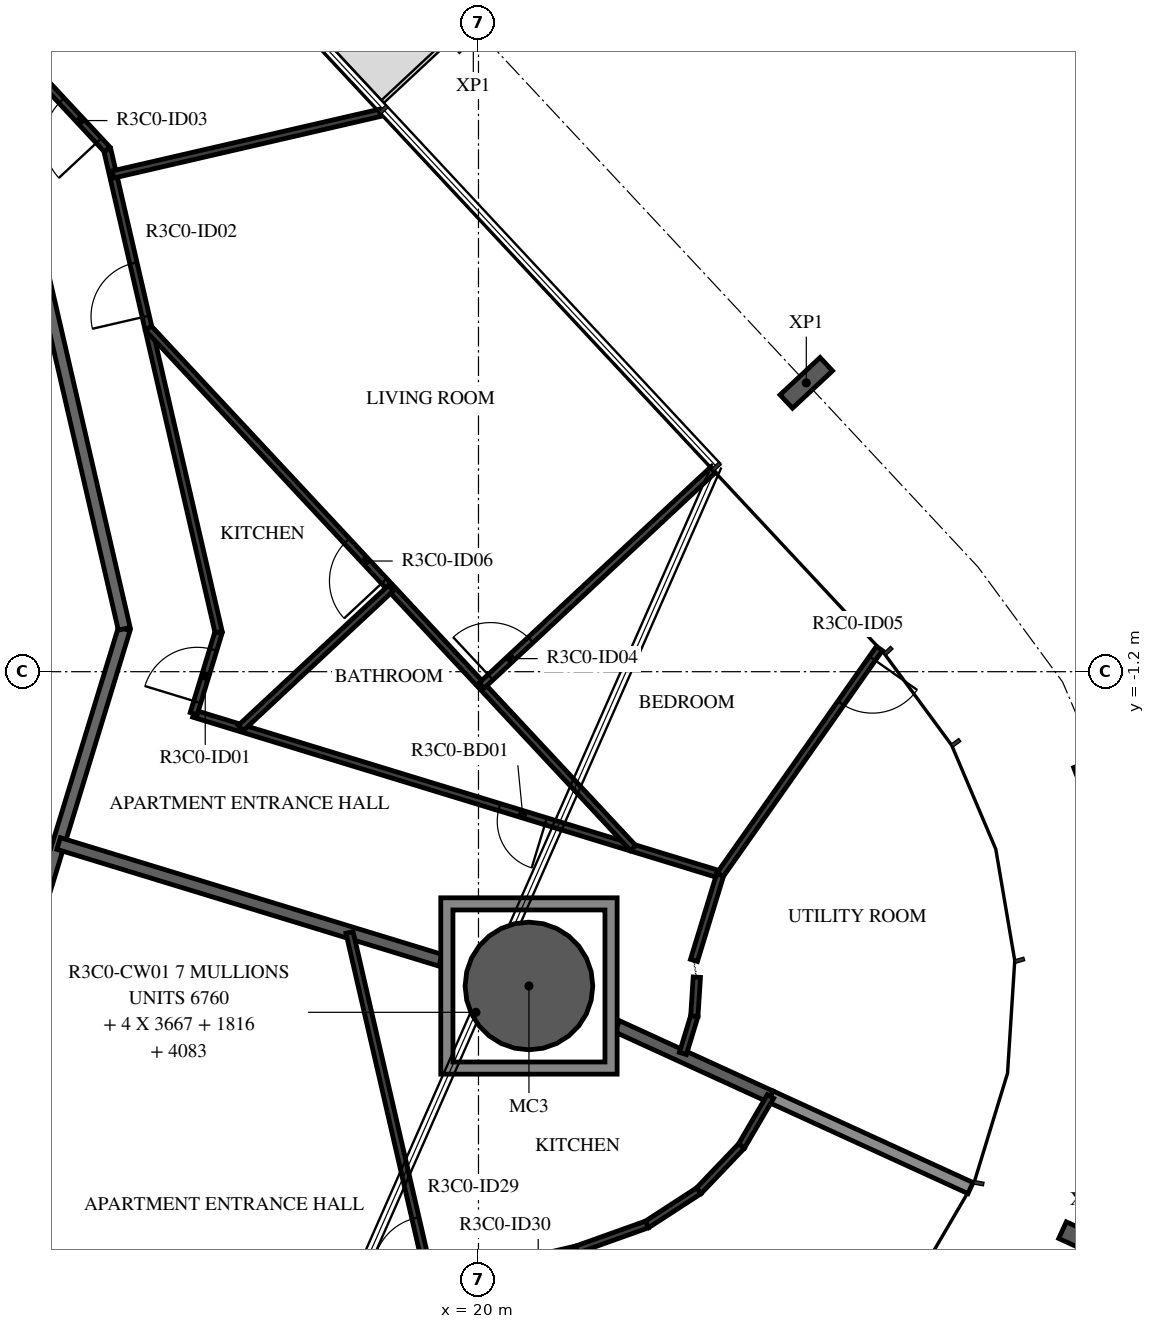
"""IFC4 building model, lengths in metres.
Left out: names, types, materials, properties, quantities, classifications, styles, units other than length and angle.
Written with IfcOpenShell. Run it as: python <this file> out.ifc"""

import sys

from ifc_helpers import new_model, si_unit, direction, frame, frame_2d, origin, origin_2d, place, context, subcontext, project, spatial, polyline, rectangle, hollow_circle, i_section, outline, extrude, element, fill, save


model = new_model("IFC4")
c1 = context("Model", 3, precision=1e-05, world=origin(), true_north=direction((0.0, 1.0)))
c2 = subcontext(c1, "Body", "Model", "MODEL_VIEW")
j1 = project(units=[si_unit("LENGTHUNIT", "METRE"), si_unit("PLANEANGLEUNIT", "RADIAN")], contexts=[c1])
p1 = place(None, origin())
s1 = spatial("IfcSite", under=j1, at=p1, CompositionType="ELEMENT")
p2 = place(p1, origin())
s2 = spatial("IfcBuilding", under=s1, at=p2, CompositionType="ELEMENT")
p3 = place(p2, frame((0.0, 0.0, 134.4)))
s3 = spatial("IfcBuildingStorey", under=s2, at=p3, CompositionType="ELEMENT", Elevation=134.4)
p4 = place(p3, frame((20.83, -6.368, -0.38), z_axis=(0.0, 0.0, 1.0), x_axis=(1.0, 0.0, 0.0)))
e1 = element("IfcColumn", 1, at=p4, inside=s3, PredefinedType="COLUMN", context=c2, shape_type="SweptSolid", body=[
    extrude(hollow_circle(Radius=1.05, WallThickness=0.05, at=origin_2d()), origin(), (0.0, 0.0, 1.0), 3.5),
])
for number, where, z_axis, x_axis in (
    (2, (30.014, -10.571, -0.38), (0.0, 0.0, 1.0), (-0.416, -0.909, 0.0)),
    (3, (30.262, -2.756, -0.38), (0.0, 0.0, 1.0), (0.358, -0.934, 0.0)),
    (4, (25.391, 3.55, -0.38), (0.0, 0.0, 1.0), (0.682, -0.731, 0.0)),
):
    element("IfcColumn", number, at=place(p3, frame(where, z_axis=z_axis, x_axis=x_axis)), inside=s3, PredefinedType="COLUMN", context=c2, shape_type="SweptSolid", body=[
        extrude(i_section(OverallWidth=0.3, OverallDepth=0.9, WebThickness=0.019, FlangeThickness=0.035, FilletRadius=0.03, at=origin_2d()), origin(), (0.0, 0.0, 1.0), 3.5),
    ])
p5 = place(p3, frame((12.028, -7.516, 0.0), z_axis=(0.0, 0.0, 1.0), x_axis=(0.292365533182, 0.956306642771, 0.0)))
e5 = element("IfcWall", 5, at=p5, inside=s3, PredefinedType="STANDARD", context=c2, shape_type="SweptSolid", body=[
    extrude(rectangle(XDim=7.342, YDim=0.2, at=frame_2d((3.671, 0.0))), origin(), (0.0, 0.0, 1.0), 3.12),
])
p6 = place(p3, frame((14.175, -0.495, 0.0), z_axis=(0.0, 0.0, 1.0), x_axis=(-0.224922649383, 0.974376622151, 0.0)))
e6 = element("IfcWall", 6, at=p6, inside=s3, PredefinedType="STANDARD", context=c2, shape_type="SweptSolid", body=[
    extrude(rectangle(XDim=7.342, YDim=0.2, at=frame_2d((3.671, 0.0))), origin(), (0.0, 0.0, 1.0), 3.12),
])
p7 = place(p3, frame((13.095, -4.026, 0.0), z_axis=(0.0, 0.0, 1.0), x_axis=(0.956303942966, -0.292374363904, 0.0)))
e7 = element("IfcWall", 7, at=p7, inside=s3, PredefinedType="STANDARD", context=c2, shape_type="SweptSolid", body=[
    extrude(rectangle(XDim=6.567, YDim=0.2, at=frame_2d((3.284, 0.0))), origin(), (0.0, 0.0, 1.0), 3.12),
])
p8 = place(p3, frame((22.28, -7.032, 0.0), z_axis=(0.0, 0.0, 1.0), x_axis=(0.909302252994, -0.416136291016, 0.0)))
e8 = element("IfcWall", 8, at=p8, inside=s3, PredefinedType="STANDARD", context=c2, shape_type="SweptSolid", body=[
    extrude(rectangle(XDim=2.773, YDim=0.2, at=frame_2d((1.387, 0.0))), origin(), (0.0, 0.0, 1.0), 3.12),
])
p9 = place(p3, frame((24.802, -8.186, 0.0), z_axis=(0.0, 0.0, 1.0), x_axis=(0.909307466213, -0.416124899387, 0.0)))
e9 = element("IfcWall", 9, at=p9, inside=s3, PredefinedType="STANDARD", context=c2, shape_type="SweptSolid", body=[
    extrude(rectangle(XDim=3.618, YDim=0.2, at=frame_2d((1.809, 0.0))), origin(), (0.0, 0.0, 1.0), 2.73),
])
p10 = place(p3, frame((23.975, -4.537, 0.0), z_axis=(0.0, 0.0, 1.0), x_axis=(-0.956300480156, 0.292385689892, 0.0)))
e10 = element("IfcWall", 10, at=p10, inside=s3, PredefinedType="PARTITIONING", context=c2, shape_type="SweptSolid", body=[
    extrude(rectangle(XDim=9.054, YDim=0.12, at=frame_2d((4.527, 0.0))), origin(), (0.0, 0.0, 1.0), 3.12),
])
p11 = place(p10, frame((2.998, 0.0, 0.0)))
e11 = element("IfcOpeningElement", 11, at=p11, cuts=e10, PredefinedType="OPENING", context=c2, shape_type="SweptSolid", body=[
    extrude(rectangle(XDim=0.8, YDim=2.1, at=frame_2d((0.4, 1.05))), frame((0.0, 0.07, 0.0), z_axis=(0.0, -1.0, 0.0), x_axis=(1.0, 0.0, 0.0)), (0.0, 0.0, 1.0), 0.14),
])
p12 = place(p3, frame((15.317, -1.89, 0.0), z_axis=(0.0, 0.0, 1.0), x_axis=(0.292360095486, 0.956308305186, 0.0)))
e12 = element("IfcWall", 12, at=p12, inside=s3, PredefinedType="PARTITIONING", context=c2, shape_type="SweptSolid", body=[
    extrude(rectangle(XDim=1.402, YDim=0.12, at=frame_2d((0.701, 0.0))), origin(), (0.0, 0.0, 1.0), 3.12),
])
p13 = place(p12, frame((0.2, 0.0, 0.0)))
e13 = element("IfcOpeningElement", 13, at=p13, cuts=e12, PredefinedType="OPENING", context=c2, shape_type="SweptSolid", body=[
    extrude(rectangle(XDim=0.9, YDim=2.1, at=frame_2d((0.45, 1.05))), frame((0.0, 0.07, 0.0), z_axis=(0.0, -1.0, 0.0), x_axis=(1.0, 0.0, 0.0)), (0.0, 0.0, 1.0), 0.14),
])
p14 = place(p3, frame((15.727, -0.549, 0.0), z_axis=(0.0, 0.0, 1.0), x_axis=(-0.22493611855, 0.974373512864, 0.0)))
e14 = element("IfcWall", 14, at=p14, inside=s3, PredefinedType="PARTITIONING", context=c2, shape_type="SweptSolid", body=[
    extrude(rectangle(XDim=8.146, YDim=0.12, at=frame_2d((4.073, 0.0))), origin(), (0.0, 0.0, 1.0), 3.12),
])
p15 = place(p14, frame((5.327, 0.0, 0.0)))
e15 = element("IfcOpeningElement", 15, at=p15, cuts=e14, PredefinedType="OPENING", context=c2, shape_type="SweptSolid", body=[
    extrude(rectangle(XDim=0.9, YDim=2.1, at=frame_2d((0.45, 1.05))), frame((0.0, 0.07, 0.0), z_axis=(0.0, -1.0, 0.0), x_axis=(1.0, 0.0, 0.0)), (0.0, 0.0, 1.0), 0.14),
])
p16 = place(p3, frame((13.894, 7.388, 0.0), z_axis=(0.0, 0.0, 1.0), x_axis=(-0.681994622729, 0.731357186721, 0.0)))
e16 = element("IfcWall", 16, at=p16, inside=s3, PredefinedType="PARTITIONING", context=c2, shape_type="SweptSolid", body=[
    extrude(rectangle(XDim=8.146, YDim=0.12, at=frame_2d((4.073, 0.0))), origin(), (0.0, 0.0, 1.0), 3.12),
])
p17 = place(p16, frame((0.2, 0.0, 0.0)))
e17 = element("IfcOpeningElement", 17, at=p17, cuts=e16, PredefinedType="OPENING", context=c2, shape_type="SweptSolid", body=[
    extrude(rectangle(XDim=0.9, YDim=2.1, at=frame_2d((0.45, 1.05))), frame((0.0, 0.07, 0.0), z_axis=(0.0, -1.0, 0.0), x_axis=(1.0, 0.0, 0.0)), (0.0, 0.0, 1.0), 0.14),
])
for number, where, z_axis, x_axis in (
    (18, (23.362, -7.478, 0.0), (0.0, 0.0, 1.0), (0.293, 0.956, 0.0)),
    (19, (23.55, -6.864, 0.0), (0.0, 0.0, 1.0), (0.064, 0.998, 0.0)),
):
    element("IfcWall", number, at=place(p3, frame(where, z_axis=z_axis, x_axis=x_axis)), inside=s3, PredefinedType="PARTITIONING", context=c2, shape_type="SweptSolid", body=[
        extrude(rectangle(XDim=0.642, YDim=0.12, at=frame_2d((0.321, 0.0))), origin(), (0.0, 0.0, 1.0), 3.12),
    ])
p18 = place(p3, frame((23.544, -5.948, 0.0), z_axis=(0.0, 0.0, 1.0), x_axis=(0.292386782861, 0.956300145983, 0.0)))
e20 = element("IfcWall", 20, at=p18, inside=s3, PredefinedType="PARTITIONING", context=c2, shape_type="SweptSolid", body=[
    extrude(rectangle(XDim=1.475, YDim=0.12, at=frame_2d((0.737, 0.0))), origin(), (0.0, 0.0, 1.0), 3.12),
])
p19 = place(p3, frame((22.543, -4.1, 0.0), z_axis=(0.0, 0.0, 1.0), x_axis=(-0.681980976228, 0.731369911921, 0.0)))
e21 = element("IfcWall", 21, at=p19, inside=s3, PredefinedType="PARTITIONING", context=c2, shape_type="SweptSolid", body=[
    extrude(rectangle(XDim=11.686, YDim=0.12, at=frame_2d((5.843, 0.0))), origin(), (0.0, 0.0, 1.0), 3.12),
])
p20 = place(p19, frame((6.003, 0.0, 0.0)))
e22 = element("IfcOpeningElement", 22, at=p20, cuts=e21, PredefinedType="OPENING", context=c2, shape_type="SweptSolid", body=[
    extrude(rectangle(XDim=0.9, YDim=2.1, at=frame_2d((0.45, 1.05))), frame((0.0, 0.07, 0.0), z_axis=(0.0, -1.0, 0.0), x_axis=(1.0, 0.0, 0.0)), (0.0, 0.0, 1.0), 0.14),
])
p21 = place(p3, frame((16.091, -2.127, 0.0), z_axis=(0.0, 0.0, 1.0), x_axis=(0.731389706697, 0.6819597473, 0.0)))
e23 = element("IfcWall", 23, at=p21, inside=s3, PredefinedType="PARTITIONING", context=c2, shape_type="SweptSolid", body=[
    extrude(rectangle(XDim=3.374, YDim=0.12, at=frame_2d((1.687, 0.0))), origin(), (0.0, 0.0, 1.0), 3.12),
])
p22 = place(p3, frame((18.379, 7.99, 0.0), z_axis=(0.0, 0.0, 1.0), x_axis=(-0.974372926515, -0.224938658471, 0.0)))
e24 = element("IfcWall", 24, at=p22, inside=s3, PredefinedType="PARTITIONING", context=c2, shape_type="SweptSolid", body=[
    extrude(rectangle(XDim=4.505, YDim=0.12, at=frame_2d((2.253, 0.0))), origin(), (0.0, 0.0, 1.0), 3.12),
])
p23 = place(p3, frame((20.052, -1.428, 0.0), z_axis=(0.0, 0.0, 1.0), x_axis=(0.73134872518, 0.682003696601, 0.0)))
e25 = element("IfcWall", 25, at=p23, inside=s3, PredefinedType="PARTITIONING", context=c2, shape_type="SweptSolid", body=[
    extrude(rectangle(XDim=5.2, YDim=0.12, at=frame_2d((2.6, 0.0))), origin(), (0.0, 0.0, 1.0), 2.73),
])
p24 = place(p23, frame((0.2, 0.0, 0.0)))
e26 = element("IfcOpeningElement", 26, at=p24, cuts=e25, PredefinedType="OPENING", context=c2, shape_type="SweptSolid", body=[
    extrude(rectangle(XDim=0.9, YDim=2.1, at=frame_2d((0.45, 1.05))), frame((0.0, 0.07, 0.0), z_axis=(0.0, -1.0, 0.0), x_axis=(1.0, 0.0, 0.0)), (0.0, 0.0, 1.0), 0.14),
])
p25 = place(p3, frame((26.593, -0.818, 0.0), z_axis=(0.0, 0.0, 1.0), x_axis=(-0.575629018128, -0.817710971853, 0.0)))
e27 = element("IfcWall", 27, at=p25, inside=s3, PredefinedType="PARTITIONING", context=c2, shape_type="SweptSolid", body=[
    extrude(rectangle(XDim=4.548, YDim=0.12, at=frame_2d((2.274, 0.0))), origin(), (0.0, 0.0, 1.0), 3.12),
])
p26 = place(p25, frame((0.2, 0.0, 0.0)))
e28 = element("IfcOpeningElement", 28, at=p26, cuts=e27, PredefinedType="OPENING", context=c2, shape_type="SweptSolid", body=[
    extrude(rectangle(XDim=0.9, YDim=2.1, at=frame_2d((0.45, 1.05))), frame((0.0, 0.07, 0.0), z_axis=(0.0, -1.0, 0.0), x_axis=(1.0, 0.0, 0.0)), (0.0, 0.0, 1.0), 0.14),
])
p27 = place(p3, frame((12.434, -9.189, 0.0), z_axis=(0.0, 0.0, 1.0), x_axis=(0.224924972887, -0.974376085796, 0.0)))
e29 = element("IfcWall", 29, at=p27, inside=s3, PredefinedType="PARTITIONING", context=c2, shape_type="SweptSolid", body=[
    extrude(rectangle(XDim=3.541, YDim=0.12, at=frame_2d((1.771, 0.0))), origin(), (0.0, 0.0, 1.0), 3.12),
])
p28 = place(p3, frame((19.211, -11.258, 0.0), z_axis=(0.0, 0.0, 1.0), x_axis=(-0.22499500936, 0.974359915926, 0.0)))
e30 = element("IfcWall", 30, at=p28, inside=s3, PredefinedType="PARTITIONING", context=c2, shape_type="SweptSolid", body=[
    extrude(rectangle(XDim=5.921, YDim=0.12, at=frame_2d((2.961, 0.0))), origin(), (0.0, 0.0, 1.0), 3.12),
])
p29 = place(p28, frame((0.2, 0.0, 0.0)))
e31 = element("IfcOpeningElement", 31, at=p29, cuts=e30, PredefinedType="OPENING", context=c2, shape_type="SweptSolid", body=[
    extrude(rectangle(XDim=0.9, YDim=2.1, at=frame_2d((0.45, 1.05))), frame((0.0, 0.07, 0.0), z_axis=(0.0, -1.0, 0.0), x_axis=(1.0, 0.0, 0.0)), (0.0, 0.0, 1.0), 0.14),
])
p30 = place(p3, frame((24.802, -8.186, 0.0), z_axis=(0.0, 0.0, 1.0), x_axis=(-0.505043103481, -0.863094122113, 0.0)))
e32 = element("IfcWall", 32, at=p30, inside=s3, PredefinedType="PARTITIONING", context=c2, shape_type="SweptSolid", body=[
    extrude(rectangle(XDim=0.945, YDim=0.12, at=frame_2d((0.473, 0.0))), origin(), (0.0, 0.0, 1.0), 3.12),
])
for number, where, z_axis, x_axis in (
    (33, (24.324, -9.002, 0.0), (0.0, 0.0, 1.0), (-0.69, -0.723, 0.0)),
    (34, (23.623, -9.737, 0.0), (0.0, 0.0, 1.0), (-0.839, -0.545, 0.0)),
):
    element("IfcWall", number, at=place(p3, frame(where, z_axis=z_axis, x_axis=x_axis)), inside=s3, PredefinedType="PARTITIONING", context=c2, shape_type="SweptSolid", body=[
        extrude(rectangle(XDim=1.016, YDim=0.12, at=frame_2d((0.508, 0.0))), origin(), (0.0, 0.0, 1.0), 3.12),
    ])
p31 = place(p3, frame((22.771, -10.29, 0.0), z_axis=(0.0, 0.0, 1.0), x_axis=(-0.941701391526, -0.336449831623, 0.0)))
e35 = element("IfcWall", 35, at=p31, inside=s3, PredefinedType="PARTITIONING", context=c2, shape_type="SweptSolid", body=[
    extrude(rectangle(XDim=1.227, YDim=0.12, at=frame_2d((0.614, 0.0))), origin(), (0.0, 0.0, 1.0), 3.12),
])
p32 = place(p3, frame((21.615, -10.703, 0.0), z_axis=(0.0, 0.0, 1.0), x_axis=(-0.974361171506, -0.224989571893, 0.0)))
e36 = element("IfcWall", 36, at=p32, inside=s3, PredefinedType="PARTITIONING", context=c2, shape_type="SweptSolid", body=[
    extrude(rectangle(XDim=2.468, YDim=0.12, at=frame_2d((1.234, 0.0))), origin(), (0.0, 0.0, 1.0), 3.12),
])
p33 = place(p32, frame((0.2, 0.0, 0.0)))
e37 = element("IfcOpeningElement", 37, at=p33, cuts=e36, PredefinedType="OPENING", context=c2, shape_type="SweptSolid", body=[
    extrude(rectangle(XDim=0.9, YDim=2.1, at=frame_2d((0.45, 1.05))), frame((0.0, 0.07, 0.0), z_axis=(0.0, -1.0, 0.0), x_axis=(1.0, 0.0, 0.0)), (0.0, 0.0, 1.0), 0.14),
])
p34 = place(p3, origin())
e38 = element("IfcWall", 38, at=p34, inside=s3, PredefinedType="STANDARD", context=c2, shape_type="SweptSolid", body=[
    extrude(outline(polyline([(22.28, -4.918), (22.28, -7.818), (19.38, -7.818), (19.38, -4.918), (22.28, -4.918)]), holes=[polyline([(19.58, -7.618), (22.08, -7.618), (22.08, -5.118), (19.58, -5.118), (19.58, -7.618)])]), origin(), (0.0, 0.0, 1.0), 3.12),
])
p35 = place(p13, origin())
e39 = element("IfcDoor", 39, at=p35, inside=s3, OperationType="SINGLE_SWING_LEFT", PredefinedType="DOOR", context=c2, shape_type="SweptSolid", body=[
    extrude(rectangle(XDim=0.9, YDim=2.1, at=frame_2d((0.45, 1.05))), frame((0.0, 0.025, 0.0), z_axis=(0.0, -1.0, 0.0), x_axis=(1.0, 0.0, 0.0)), (0.0, 0.0, 1.0), 0.05),
])
fill(e13, e39)
p36 = place(p15, origin())
e40 = element("IfcDoor", 40, at=p36, inside=s3, OperationType="SINGLE_SWING_LEFT", PredefinedType="DOOR", context=c2, shape_type="SweptSolid", body=[
    extrude(rectangle(XDim=0.9, YDim=2.1, at=frame_2d((0.45, 1.05))), frame((0.0, 0.025, 0.0), z_axis=(0.0, -1.0, 0.0), x_axis=(1.0, 0.0, 0.0)), (0.0, 0.0, 1.0), 0.05),
])
fill(e15, e40)
p37 = place(p17, origin())
e41 = element("IfcDoor", 41, at=p37, inside=s3, OperationType="SINGLE_SWING_LEFT", PredefinedType="DOOR", context=c2, shape_type="SweptSolid", body=[
    extrude(rectangle(XDim=0.9, YDim=2.1, at=frame_2d((0.45, 1.05))), frame((0.0, 0.025, 0.0), z_axis=(0.0, -1.0, 0.0), x_axis=(1.0, 0.0, 0.0)), (0.0, 0.0, 1.0), 0.05),
])
fill(e17, e41)
p38 = place(p11, origin())
e42 = element("IfcDoor", 42, at=p38, inside=s3, OperationType="SINGLE_SWING_LEFT", PredefinedType="DOOR", context=c2, shape_type="SweptSolid", body=[
    extrude(rectangle(XDim=0.8, YDim=2.1, at=frame_2d((0.4, 1.05))), frame((0.0, 0.025, 0.0), z_axis=(0.0, -1.0, 0.0), x_axis=(1.0, 0.0, 0.0)), (0.0, 0.0, 1.0), 0.05),
])
fill(e11, e42)
p39 = place(p24, origin())
e43 = element("IfcDoor", 43, at=p39, inside=s3, OperationType="SINGLE_SWING_LEFT", PredefinedType="DOOR", context=c2, shape_type="SweptSolid", body=[
    extrude(rectangle(XDim=0.9, YDim=2.1, at=frame_2d((0.45, 1.05))), frame((0.0, 0.025, 0.0), z_axis=(0.0, -1.0, 0.0), x_axis=(1.0, 0.0, 0.0)), (0.0, 0.0, 1.0), 0.05),
])
fill(e26, e43)
p40 = place(p26, origin())
e44 = element("IfcDoor", 44, at=p40, inside=s3, OperationType="SINGLE_SWING_LEFT", PredefinedType="DOOR", context=c2, shape_type="SweptSolid", body=[
    extrude(rectangle(XDim=0.9, YDim=2.1, at=frame_2d((0.45, 1.05))), frame((0.0, 0.025, 0.0), z_axis=(0.0, -1.0, 0.0), x_axis=(1.0, 0.0, 0.0)), (0.0, 0.0, 1.0), 0.05),
])
fill(e28, e44)
p41 = place(p20, origin())
e45 = element("IfcDoor", 45, at=p41, inside=s3, OperationType="SINGLE_SWING_RIGHT", PredefinedType="DOOR", context=c2, shape_type="SweptSolid", body=[
    extrude(rectangle(XDim=0.9, YDim=2.1, at=frame_2d((0.45, 1.05))), frame((0.0, 0.025, 0.0), z_axis=(0.0, -1.0, 0.0), x_axis=(1.0, 0.0, 0.0)), (0.0, 0.0, 1.0), 0.05),
])
fill(e22, e45)
p42 = place(p29, origin())
e46 = element("IfcDoor", 46, at=p42, inside=s3, OperationType="SINGLE_SWING_RIGHT", PredefinedType="DOOR", context=c2, shape_type="SweptSolid", body=[
    extrude(rectangle(XDim=0.9, YDim=2.1, at=frame_2d((0.45, 1.05))), frame((0.0, 0.025, 0.0), z_axis=(0.0, -1.0, 0.0), x_axis=(1.0, 0.0, 0.0)), (0.0, 0.0, 1.0), 0.05),
])
fill(e31, e46)
save(model, sys.argv[1])
